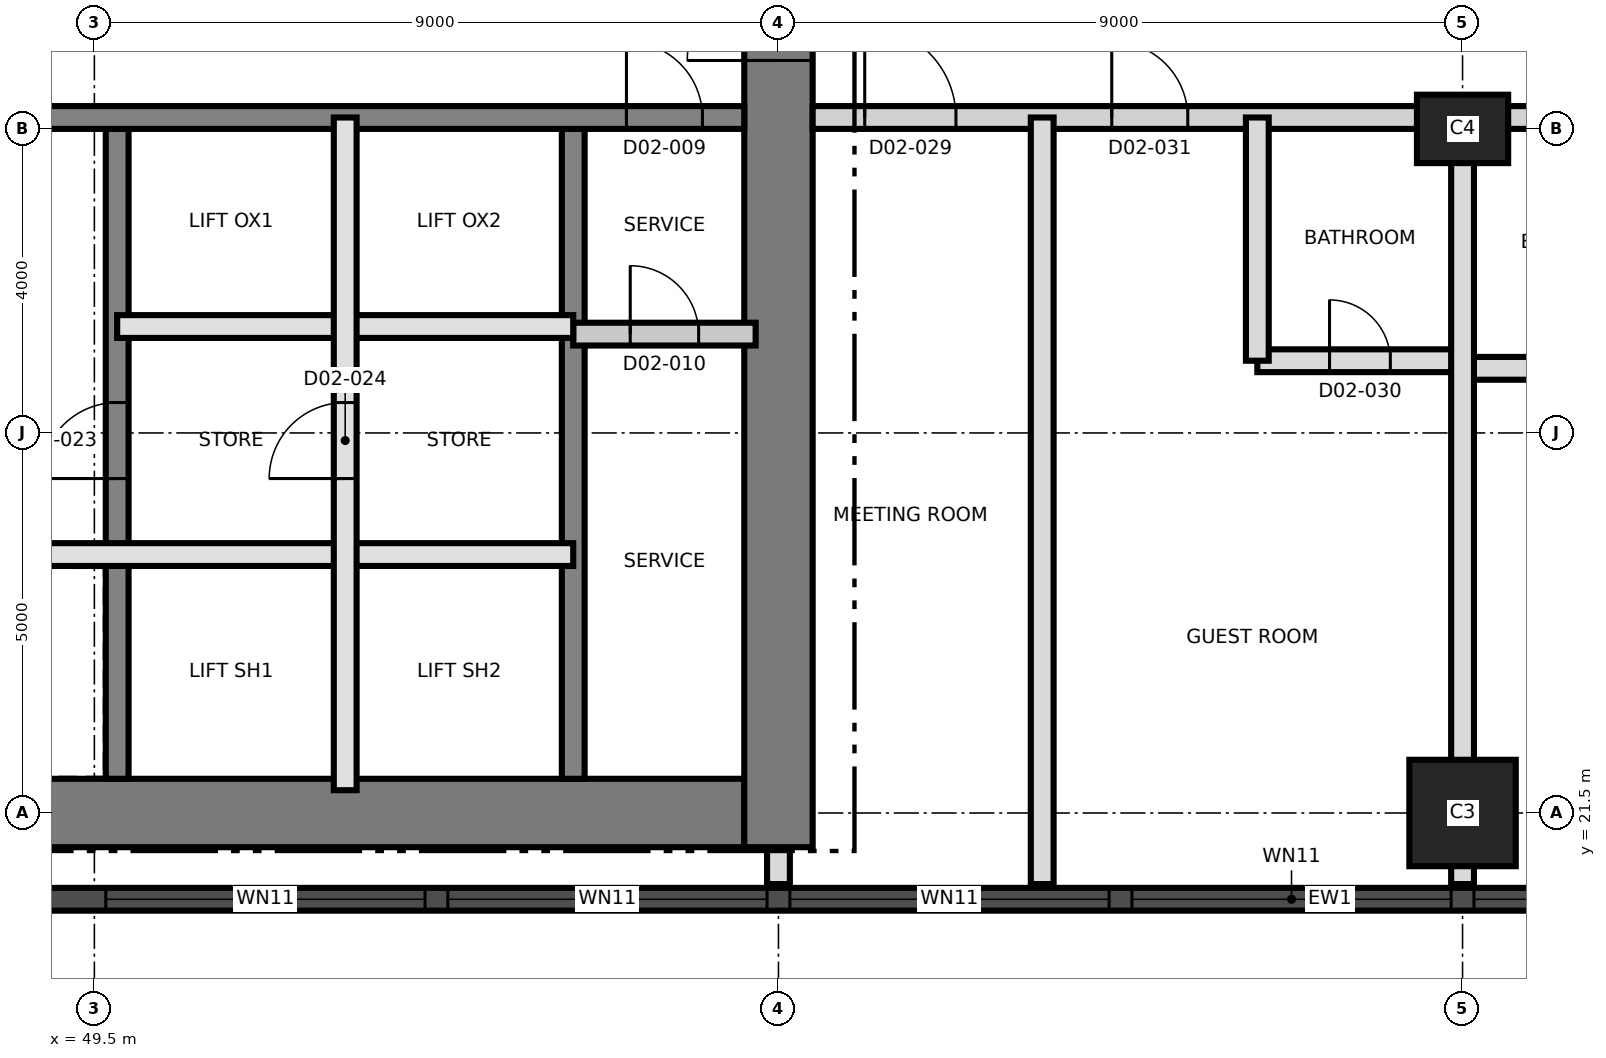
"""IFC4 building model, lengths in metres.
Left out: names, types, materials, properties, quantities, classifications, styles, units other than length and angle.
Written with IfcOpenShell. Run it as: python <this file> out.ifc"""

import sys

from ifc_helpers import new_model, si_unit, direction, frame, frame_2d, origin, origin_2d, place, context, subcontext, project, spatial, rectangle, extrude, element, fill, save


model = new_model("IFC4")
c1 = context("Model", 3, precision=1e-05, world=origin(), true_north=direction((0.0, 1.0)))
c2 = subcontext(c1, "Body", "Model", "MODEL_VIEW")
j1 = project(units=[si_unit("LENGTHUNIT", "METRE"), si_unit("PLANEANGLEUNIT", "RADIAN")], contexts=[c1])
p1 = place(None, origin())
s1 = spatial("IfcSite", under=j1, at=p1, CompositionType="ELEMENT")
p2 = place(p1, origin())
s2 = spatial("IfcBuilding", under=s1, at=p2, CompositionType="ELEMENT")
p3 = place(p2, frame((0.0, 0.0, 44.6)))
s3 = spatial("IfcBuildingStorey", under=s2, at=p3, CompositionType="ELEMENT", Elevation=44.6)
p4 = place(p3, frame((31.05, 21.5, 0.0), z_axis=(0.0, 0.0, 1.0), x_axis=(1.0, 0.0, 0.0)))
e1 = element("IfcWall", 1, at=p4, inside=s3, PredefinedType="SHEAR", context=c2, shape_type="SweptSolid", body=[
    extrude(rectangle(XDim=27.0, YDim=0.9, at=frame_2d((13.5, 0.0))), origin(), (0.0, 0.0, 1.0), 3.7),
])
p5 = place(p3, frame((58.5, 21.05, 0.0), z_axis=(0.0, 0.0, 1.0), x_axis=(0.0, 1.0, 0.0)))
e2 = element("IfcWall", 2, at=p5, inside=s3, PredefinedType="SHEAR", context=c2, shape_type="SweptSolid", body=[
    extrude(rectangle(XDim=18.9, YDim=0.9, at=frame_2d((9.45, 0.0))), origin(), (0.0, 0.0, 1.0), 3.7),
])
p6 = place(p5, frame((10.35, 0.0, 0.0)))
e3 = element("IfcOpeningElement", 3, at=p6, cuts=e2, PredefinedType="OPENING", context=c2, shape_type="SweptSolid", body=[
    extrude(rectangle(XDim=1.2, YDim=2.1, at=frame_2d((0.6, 1.05))), frame((0.0, 0.46, 0.0), z_axis=(0.0, -1.0, 0.0), x_axis=(1.0, 0.0, 0.0)), (0.0, 0.0, 1.0), 0.92),
])
p7 = place(p3, frame((49.8, 21.95, 0.0), z_axis=(0.0, 0.0, 1.0), x_axis=(0.0, 1.0, 0.0)))
e4 = element("IfcWall", 4, at=p7, inside=s3, PredefinedType="SHEAR", context=c2, shape_type="SweptSolid", body=[
    extrude(rectangle(XDim=8.55, YDim=0.3, at=frame_2d((4.275, 0.0))), origin(), (0.0, 0.0, 1.0), 3.7),
])
p8 = place(p7, frame((3.95, 0.0, 0.0)))
e5 = element("IfcOpeningElement", 5, at=p8, cuts=e4, PredefinedType="OPENING", context=c2, shape_type="SweptSolid", body=[
    extrude(rectangle(XDim=1.0, YDim=2.1, at=frame_2d((0.5, 1.05))), frame((0.0, 0.16, 0.0), z_axis=(0.0, -1.0, 0.0), x_axis=(1.0, 0.0, 0.0)), (0.0, 0.0, 1.0), 0.32),
])
p9 = place(p3, frame((55.8, 21.95, 0.0), z_axis=(0.0, 0.0, 1.0), x_axis=(0.0, 1.0, 0.0)))
e6 = element("IfcWall", 6, at=p9, inside=s3, PredefinedType="SHEAR", context=c2, shape_type="SweptSolid", body=[
    extrude(rectangle(XDim=8.55, YDim=0.3, at=frame_2d((4.275, 0.0))), origin(), (0.0, 0.0, 1.0), 3.7),
])
p10 = place(p3, frame((31.95, 30.65, 0.0), z_axis=(0.0, 0.0, 1.0), x_axis=(1.0, 0.0, 0.0)))
e7 = element("IfcWall", 7, at=p10, inside=s3, PredefinedType="SHEAR", context=c2, shape_type="SweptSolid", body=[
    extrude(rectangle(XDim=26.1, YDim=0.3, at=frame_2d((13.05, 0.0))), origin(), (0.0, 0.0, 1.0), 3.7),
])
p11 = place(p10, frame((24.55, 0.0, 0.0)))
e8 = element("IfcOpeningElement", 8, at=p11, cuts=e7, PredefinedType="OPENING", context=c2, shape_type="SweptSolid", body=[
    extrude(rectangle(XDim=1.0, YDim=2.1, at=frame_2d((0.5, 1.05))), frame((0.0, 0.16, 0.0), z_axis=(0.0, -1.0, 0.0), x_axis=(1.0, 0.0, 0.0)), (0.0, 0.0, 1.0), 0.32),
])
p12 = place(p10, frame((11.35, 0.0, 0.0)))
e9 = element("IfcOpeningElement", 9, at=p12, cuts=e7, PredefinedType="OPENING", context=c2, shape_type="SweptSolid", body=[
    extrude(rectangle(XDim=1.0, YDim=2.1, at=frame_2d((0.5, 1.05))), frame((0.0, 0.16, 0.0), z_axis=(0.0, -1.0, 0.0), x_axis=(1.0, 0.0, 0.0)), (0.0, 0.0, 1.0), 0.32),
])
p13 = place(p3, frame((67.5, 21.5, 0.0), z_axis=(0.0, 0.0, 1.0), x_axis=(1.0, 0.0, 0.0)))
e10 = element("IfcColumn", 10, at=p13, inside=s3, PredefinedType="COLUMN", context=c2, shape_type="SweptSolid", body=[
    extrude(rectangle(XDim=1.4, YDim=1.4, at=origin_2d()), origin(), (0.0, 0.0, 1.0), 3.7),
])
p14 = place(p3, frame((67.5, 30.5, 0.0), z_axis=(0.0, 0.0, 1.0), x_axis=(1.0, 0.0, 0.0)))
e11 = element("IfcColumn", 11, at=p14, inside=s3, PredefinedType="COLUMN", context=c2, shape_type="SweptSolid", body=[
    extrude(rectangle(XDim=1.2, YDim=0.9, at=origin_2d()), origin(), (0.0, 0.0, 1.0), 3.7),
])
p15 = place(p3, frame((44.021, 20.365, 0.0), z_axis=(0.0, 0.0, 1.0), x_axis=(1.0, 0.0, 0.0)))
e12 = element("IfcWall", 12, at=p15, inside=s3, PredefinedType="SOLIDWALL", context=c2, shape_type="SweptSolid", body=[
    extrude(rectangle(XDim=43.466, YDim=0.3, at=frame_2d((21.733, 0.0))), origin(), (0.0, 0.0, 1.0), 3.4),
])
p16 = place(p15, frame((1.84, 0.0, 0.3)))
e13 = element("IfcOpeningElement", 13, at=p16, cuts=e12, PredefinedType="OPENING", context=c2, shape_type="SweptSolid", body=[
    extrude(rectangle(XDim=1.8, YDim=2.4, at=frame_2d((0.9, 1.2))), frame((0.0, 0.16, 0.0), z_axis=(0.0, -1.0, 0.0), x_axis=(1.0, 0.0, 0.0)), (0.0, 0.0, 1.0), 0.32),
])
p17 = place(p15, frame((5.63, 0.0, 0.9)))
e14 = element("IfcOpeningElement", 14, at=p17, cuts=e12, PredefinedType="OPENING", context=c2, shape_type="SweptSolid", body=[
    extrude(rectangle(XDim=4.2, YDim=1.5, at=frame_2d((2.1, 0.75))), frame((0.0, 0.16, 0.0), z_axis=(0.0, -1.0, 0.0), x_axis=(1.0, 0.0, 0.0)), (0.0, 0.0, 1.0), 0.32),
])
p18 = place(p15, frame((10.13, 0.0, 0.9)))
e15 = element("IfcOpeningElement", 15, at=p18, cuts=e12, PredefinedType="OPENING", context=c2, shape_type="SweptSolid", body=[
    extrude(rectangle(XDim=4.2, YDim=1.5, at=frame_2d((2.1, 0.75))), frame((0.0, 0.16, 0.0), z_axis=(0.0, -1.0, 0.0), x_axis=(1.0, 0.0, 0.0)), (0.0, 0.0, 1.0), 0.32),
])
p19 = place(p15, frame((14.63, 0.0, 0.9)))
e16 = element("IfcOpeningElement", 16, at=p19, cuts=e12, PredefinedType="OPENING", context=c2, shape_type="SweptSolid", body=[
    extrude(rectangle(XDim=4.2, YDim=1.5, at=frame_2d((2.1, 0.75))), frame((0.0, 0.16, 0.0), z_axis=(0.0, -1.0, 0.0), x_axis=(1.0, 0.0, 0.0)), (0.0, 0.0, 1.0), 0.32),
])
p20 = place(p15, frame((19.13, 0.0, 0.9)))
e17 = element("IfcOpeningElement", 17, at=p20, cuts=e12, PredefinedType="OPENING", context=c2, shape_type="SweptSolid", body=[
    extrude(rectangle(XDim=4.2, YDim=1.5, at=frame_2d((2.1, 0.75))), frame((0.0, 0.16, 0.0), z_axis=(0.0, -1.0, 0.0), x_axis=(1.0, 0.0, 0.0)), (0.0, 0.0, 1.0), 0.32),
])
p21 = place(p15, frame((23.63, 0.0, 0.9)))
e18 = element("IfcOpeningElement", 18, at=p21, cuts=e12, PredefinedType="OPENING", context=c2, shape_type="SweptSolid", body=[
    extrude(rectangle(XDim=4.2, YDim=1.5, at=frame_2d((2.1, 0.75))), frame((0.0, 0.16, 0.0), z_axis=(0.0, -1.0, 0.0), x_axis=(1.0, 0.0, 0.0)), (0.0, 0.0, 1.0), 0.32),
])
p22 = place(p15, frame((28.13, 0.0, 0.9)))
e19 = element("IfcOpeningElement", 19, at=p22, cuts=e12, PredefinedType="OPENING", context=c2, shape_type="SweptSolid", body=[
    extrude(rectangle(XDim=4.2, YDim=1.5, at=frame_2d((2.1, 0.75))), frame((0.0, 0.16, 0.0), z_axis=(0.0, -1.0, 0.0), x_axis=(1.0, 0.0, 0.0)), (0.0, 0.0, 1.0), 0.32),
])
p23 = place(p15, frame((32.63, 0.0, 0.9)))
e20 = element("IfcOpeningElement", 20, at=p23, cuts=e12, PredefinedType="OPENING", context=c2, shape_type="SweptSolid", body=[
    extrude(rectangle(XDim=4.2, YDim=1.5, at=frame_2d((2.1, 0.75))), frame((0.0, 0.16, 0.0), z_axis=(0.0, -1.0, 0.0), x_axis=(1.0, 0.0, 0.0)), (0.0, 0.0, 1.0), 0.32),
])
p24 = place(p15, frame((37.13, 0.0, 0.9)))
e21 = element("IfcOpeningElement", 21, at=p24, cuts=e12, PredefinedType="OPENING", context=c2, shape_type="SweptSolid", body=[
    extrude(rectangle(XDim=4.2, YDim=1.5, at=frame_2d((2.1, 0.75))), frame((0.0, 0.16, 0.0), z_axis=(0.0, -1.0, 0.0), x_axis=(1.0, 0.0, 0.0)), (0.0, 0.0, 1.0), 0.32),
])
p25 = place(p3, frame((46.8, 24.9, 0.0), z_axis=(0.0, 0.0, 1.0), x_axis=(1.0, 0.0, 0.0)))
e22 = element("IfcWall", 22, at=p25, inside=s3, PredefinedType="SOLIDWALL", context=c2, shape_type="SweptSolid", body=[
    extrude(rectangle(XDim=9.0, YDim=0.3, at=frame_2d((4.5, 0.0))), origin(), (0.0, 0.0, 1.0), 3.4),
])
p26 = place(p25, frame((1.05, 0.0, 0.0)))
e23 = element("IfcOpeningElement", 23, at=p26, cuts=e22, PredefinedType="OPENING", context=c2, shape_type="SweptSolid", body=[
    extrude(rectangle(XDim=0.9, YDim=2.1, at=frame_2d((0.45, 1.05))), frame((0.0, 0.16, 0.0), z_axis=(0.0, -1.0, 0.0), x_axis=(1.0, 0.0, 0.0)), (0.0, 0.0, 1.0), 0.32),
])
p27 = place(p3, frame((55.8, 27.8, 0.0), z_axis=(0.0, 0.0, 1.0), x_axis=(1.0, 0.0, 0.0)))
e24 = element("IfcWall", 24, at=p27, inside=s3, PredefinedType="PARTITIONING", context=c2, shape_type="SweptSolid", body=[
    extrude(rectangle(XDim=2.4, YDim=0.3, at=frame_2d((1.2, 0.0))), origin(), (0.0, 0.0, 1.0), 3.4),
])
p28 = place(p27, frame((0.75, 0.0, 0.0)))
e25 = element("IfcOpeningElement", 25, at=p28, cuts=e24, PredefinedType="OPENING", context=c2, shape_type="SweptSolid", body=[
    extrude(rectangle(XDim=0.9, YDim=2.1, at=frame_2d((0.45, 1.05))), frame((0.0, 0.16, 0.0), z_axis=(0.0, -1.0, 0.0), x_axis=(1.0, 0.0, 0.0)), (0.0, 0.0, 1.0), 0.32),
])
p29 = place(p3, frame((49.8, 27.9, 0.0), z_axis=(0.0, 0.0, 1.0), x_axis=(1.0, 0.0, 0.0)))
e26 = element("IfcWall", 26, at=p29, inside=s3, PredefinedType="SOLIDWALL", context=c2, shape_type="SweptSolid", body=[
    extrude(rectangle(XDim=6.0, YDim=0.3, at=frame_2d((3.0, 0.0))), origin(), (0.0, 0.0, 1.0), 3.4),
])
p30 = place(p3, frame((52.8, 21.8, 0.0), z_axis=(0.0, 0.0, 1.0), x_axis=(0.0, 1.0, 0.0)))
e27 = element("IfcWall", 27, at=p30, inside=s3, PredefinedType="SOLIDWALL", context=c2, shape_type="SweptSolid", body=[
    extrude(rectangle(XDim=8.85, YDim=0.3, at=frame_2d((4.425, 0.0))), origin(), (0.0, 0.0, 1.0), 3.4),
])
p31 = place(p30, frame((4.1, 0.0, 0.0)))
e28 = element("IfcOpeningElement", 28, at=p31, cuts=e27, PredefinedType="OPENING", context=c2, shape_type="SweptSolid", body=[
    extrude(rectangle(XDim=1.0, YDim=2.1, at=frame_2d((0.5, 1.05))), frame((0.0, 0.16, 0.0), z_axis=(0.0, -1.0, 0.0), x_axis=(1.0, 0.0, 0.0)), (0.0, 0.0, 1.0), 0.32),
])
p32 = place(p3, frame((67.5, 27.35, 0.0), z_axis=(0.0, 0.0, 1.0), x_axis=(1.0, 0.0, 0.0)))
e29 = element("IfcWall", 29, at=p32, inside=s3, PredefinedType="PARTITIONING", context=c2, shape_type="SweptSolid", body=[
    extrude(rectangle(XDim=3.0, YDim=0.3, at=frame_2d((1.5, 0.0))), origin(), (0.0, 0.0, 1.0), 3.4),
])
p33 = place(p32, frame((1.1, 0.0, 0.0)))
e30 = element("IfcOpeningElement", 30, at=p33, cuts=e29, PredefinedType="OPENING", context=c2, shape_type="SweptSolid", body=[
    extrude(rectangle(XDim=0.8, YDim=2.1, at=frame_2d((0.4, 1.05))), frame((0.0, 0.16, 0.0), z_axis=(0.0, -1.0, 0.0), x_axis=(1.0, 0.0, 0.0)), (0.0, 0.0, 1.0), 0.32),
])
p34 = place(p3, frame((64.8, 27.45, 0.0), z_axis=(0.0, 0.0, 1.0), x_axis=(1.0, 0.0, 0.0)))
e31 = element("IfcWall", 31, at=p34, inside=s3, PredefinedType="PARTITIONING", context=c2, shape_type="SweptSolid", body=[
    extrude(rectangle(XDim=2.7, YDim=0.3, at=frame_2d((1.35, 0.0))), origin(), (0.0, 0.0, 1.0), 3.4),
])
p35 = place(p34, frame((0.95, 0.0, 0.0)))
e32 = element("IfcOpeningElement", 32, at=p35, cuts=e31, PredefinedType="OPENING", context=c2, shape_type="SweptSolid", body=[
    extrude(rectangle(XDim=0.8, YDim=2.1, at=frame_2d((0.4, 1.05))), frame((0.0, 0.16, 0.0), z_axis=(0.0, -1.0, 0.0), x_axis=(1.0, 0.0, 0.0)), (0.0, 0.0, 1.0), 0.32),
])
p36 = place(p3, frame((58.95, 30.65, 0.0), z_axis=(0.0, 0.0, 1.0), x_axis=(1.0, 0.0, 0.0)))
e33 = element("IfcWall", 33, at=p36, inside=s3, PredefinedType="PARTITIONING", context=c2, shape_type="SweptSolid", body=[
    extrude(rectangle(XDim=26.38, YDim=0.3, at=frame_2d((13.19, 0.0))), origin(), (0.0, 0.0, 1.0), 3.4),
])
p37 = place(p36, frame((0.685, 0.0, 0.0)))
e34 = element("IfcOpeningElement", 34, at=p37, cuts=e33, PredefinedType="OPENING", context=c2, shape_type="SweptSolid", body=[
    extrude(rectangle(XDim=1.2, YDim=2.1, at=frame_2d((0.6, 1.05))), frame((0.0, 0.16, 0.0), z_axis=(0.0, -1.0, 0.0), x_axis=(1.0, 0.0, 0.0)), (0.0, 0.0, 1.0), 0.32),
])
p38 = place(p36, frame((3.935, 0.0, 0.0)))
e35 = element("IfcOpeningElement", 35, at=p38, cuts=e33, PredefinedType="OPENING", context=c2, shape_type="SweptSolid", body=[
    extrude(rectangle(XDim=1.0, YDim=2.1, at=frame_2d((0.5, 1.05))), frame((0.0, 0.16, 0.0), z_axis=(0.0, -1.0, 0.0), x_axis=(1.0, 0.0, 0.0)), (0.0, 0.0, 1.0), 0.32),
])
p39 = place(p36, frame((12.55, 0.0, 0.0)))
e36 = element("IfcOpeningElement", 36, at=p39, cuts=e33, PredefinedType="OPENING", context=c2, shape_type="SweptSolid", body=[
    extrude(rectangle(XDim=1.0, YDim=2.4, at=frame_2d((0.5, 1.2))), frame((0.0, 0.16, 0.0), z_axis=(0.0, -1.0, 0.0), x_axis=(1.0, 0.0, 0.0)), (0.0, 0.0, 1.0), 0.32),
])
p40 = place(p36, frame((20.98, 0.0, 0.0)))
e37 = element("IfcOpeningElement", 37, at=p40, cuts=e33, PredefinedType="OPENING", context=c2, shape_type="SweptSolid", body=[
    extrude(rectangle(XDim=1.0, YDim=2.4, at=frame_2d((0.5, 1.2))), frame((0.0, 0.16, 0.0), z_axis=(0.0, -1.0, 0.0), x_axis=(1.0, 0.0, 0.0)), (0.0, 0.0, 1.0), 0.32),
])
p41 = place(p36, frame((22.63, 0.0, 0.0)))
e38 = element("IfcOpeningElement", 38, at=p41, cuts=e33, PredefinedType="OPENING", context=c2, shape_type="SweptSolid", body=[
    extrude(rectangle(XDim=1.0, YDim=2.4, at=frame_2d((0.5, 1.2))), frame((0.0, 0.16, 0.0), z_axis=(0.0, -1.0, 0.0), x_axis=(1.0, 0.0, 0.0)), (0.0, 0.0, 1.0), 0.32),
])
p42 = place(p3, frame((58.5, 20.565, 0.0), z_axis=(0.0, 0.0, 1.0), x_axis=(0.0, 1.0, 0.0)))
e39 = element("IfcWall", 39, at=p42, inside=s3, PredefinedType="PARTITIONING", context=c2, shape_type="SweptSolid", body=[
    extrude(rectangle(XDim=0.465, YDim=0.3, at=frame_2d((0.232, 0.0))), origin(), (0.0, 0.0, 1.0), 3.4),
])
p43 = place(p3, frame((61.97, 20.565, 0.0), z_axis=(0.0, 0.0, 1.0), x_axis=(0.0, 1.0, 0.0)))
e40 = element("IfcWall", 40, at=p43, inside=s3, PredefinedType="PARTITIONING", context=c2, shape_type="SweptSolid", body=[
    extrude(rectangle(XDim=10.085, YDim=0.3, at=frame_2d((5.042, 0.0))), origin(), (0.0, 0.0, 1.0), 3.4),
])
p44 = place(p3, frame((64.8, 27.45, 0.0), z_axis=(0.0, 0.0, 1.0), x_axis=(0.0, 1.0, 0.0)))
e41 = element("IfcWall", 41, at=p44, inside=s3, PredefinedType="PARTITIONING", context=c2, shape_type="SweptSolid", body=[
    extrude(rectangle(XDim=3.2, YDim=0.3, at=frame_2d((1.6, 0.0))), origin(), (0.0, 0.0, 1.0), 3.4),
])
p45 = place(p3, frame((67.5, 20.565, 0.0), z_axis=(0.0, 0.0, 1.0), x_axis=(0.0, 1.0, 0.0)))
e42 = element("IfcWall", 42, at=p45, inside=s3, PredefinedType="PARTITIONING", context=c2, shape_type="SweptSolid", body=[
    extrude(rectangle(XDim=10.085, YDim=0.3, at=frame_2d((5.042, 0.0))), origin(), (0.0, 0.0, 1.0), 3.4),
])
p46 = place(p17, origin())
e43 = element("IfcWindow", 43, at=p46, inside=s3, PartitioningType="SINGLE_PANEL", PredefinedType="WINDOW", context=c2, shape_type="SweptSolid", body=[
    extrude(rectangle(XDim=4.2, YDim=1.5, at=frame_2d((2.1, 0.75))), frame((0.0, 0.03, 0.0), z_axis=(0.0, -1.0, 0.0), x_axis=(1.0, 0.0, 0.0)), (0.0, 0.0, 1.0), 0.06),
])
fill(e14, e43)
p47 = place(p18, origin())
e44 = element("IfcWindow", 44, at=p47, inside=s3, PartitioningType="SINGLE_PANEL", PredefinedType="WINDOW", context=c2, shape_type="SweptSolid", body=[
    extrude(rectangle(XDim=4.2, YDim=1.5, at=frame_2d((2.1, 0.75))), frame((0.0, 0.03, 0.0), z_axis=(0.0, -1.0, 0.0), x_axis=(1.0, 0.0, 0.0)), (0.0, 0.0, 1.0), 0.06),
])
fill(e15, e44)
p48 = place(p19, origin())
e45 = element("IfcWindow", 45, at=p48, inside=s3, PartitioningType="SINGLE_PANEL", PredefinedType="WINDOW", context=c2, shape_type="SweptSolid", body=[
    extrude(rectangle(XDim=4.2, YDim=1.5, at=frame_2d((2.1, 0.75))), frame((0.0, 0.03, 0.0), z_axis=(0.0, -1.0, 0.0), x_axis=(1.0, 0.0, 0.0)), (0.0, 0.0, 1.0), 0.06),
])
fill(e16, e45)
p49 = place(p20, origin())
e46 = element("IfcWindow", 46, at=p49, inside=s3, PartitioningType="SINGLE_PANEL", PredefinedType="WINDOW", context=c2, shape_type="SweptSolid", body=[
    extrude(rectangle(XDim=4.2, YDim=1.5, at=frame_2d((2.1, 0.75))), frame((0.0, 0.03, 0.0), z_axis=(0.0, -1.0, 0.0), x_axis=(1.0, 0.0, 0.0)), (0.0, 0.0, 1.0), 0.06),
])
fill(e17, e46)
p50 = place(p21, origin())
e47 = element("IfcWindow", 47, at=p50, inside=s3, PartitioningType="SINGLE_PANEL", PredefinedType="WINDOW", context=c2, shape_type="SweptSolid", body=[
    extrude(rectangle(XDim=4.2, YDim=1.5, at=frame_2d((2.1, 0.75))), frame((0.0, 0.03, 0.0), z_axis=(0.0, -1.0, 0.0), x_axis=(1.0, 0.0, 0.0)), (0.0, 0.0, 1.0), 0.06),
])
fill(e18, e47)
p51 = place(p11, origin())
e48 = element("IfcDoor", 48, at=p51, inside=s3, OperationType="SINGLE_SWING_LEFT", PredefinedType="DOOR", context=c2, shape_type="SweptSolid", body=[
    extrude(rectangle(XDim=1.0, YDim=2.1, at=frame_2d((0.5, 1.05))), frame((0.0, 0.025, 0.0), z_axis=(0.0, -1.0, 0.0), x_axis=(1.0, 0.0, 0.0)), (0.0, 0.0, 1.0), 0.05),
])
fill(e8, e48)
p52 = place(p28, origin())
e49 = element("IfcDoor", 49, at=p52, inside=s3, OperationType="SINGLE_SWING_RIGHT", PredefinedType="DOOR", context=c2, shape_type="SweptSolid", body=[
    extrude(rectangle(XDim=0.9, YDim=2.1, at=frame_2d((0.45, 1.05))), frame((0.0, 0.025, 0.0), z_axis=(0.0, -1.0, 0.0), x_axis=(1.0, 0.0, 0.0)), (0.0, 0.0, 1.0), 0.05),
])
fill(e25, e49)
p53 = place(p6, origin())
e50 = element("IfcDoor", 50, at=p53, inside=s3, OperationType="SINGLE_SWING_LEFT", PredefinedType="DOOR", context=c2, shape_type="SweptSolid", body=[
    extrude(rectangle(XDim=1.2, YDim=2.1, at=frame_2d((0.6, 1.05))), frame((0.0, 0.025, 0.0), z_axis=(0.0, -1.0, 0.0), x_axis=(1.0, 0.0, 0.0)), (0.0, 0.0, 1.0), 0.05),
])
fill(e3, e50)
p54 = place(p8, origin())
e51 = element("IfcDoor", 51, at=p54, inside=s3, OperationType="SINGLE_SWING_LEFT", PredefinedType="DOOR", context=c2, shape_type="SweptSolid", body=[
    extrude(rectangle(XDim=1.0, YDim=2.1, at=frame_2d((0.5, 1.05))), frame((0.0, 0.025, 0.0), z_axis=(0.0, -1.0, 0.0), x_axis=(1.0, 0.0, 0.0)), (0.0, 0.0, 1.0), 0.05),
])
fill(e5, e51)
p55 = place(p31, origin())
e52 = element("IfcDoor", 52, at=p55, inside=s3, OperationType="SINGLE_SWING_RIGHT", PredefinedType="DOOR", context=c2, shape_type="SweptSolid", body=[
    extrude(rectangle(XDim=1.0, YDim=2.1, at=frame_2d((0.5, 1.05))), frame((0.0, 0.025, 0.0), z_axis=(0.0, -1.0, 0.0), x_axis=(1.0, 0.0, 0.0)), (0.0, 0.0, 1.0), 0.05),
])
fill(e28, e52)
p56 = place(p37, origin())
e53 = element("IfcDoor", 53, at=p56, inside=s3, OperationType="SINGLE_SWING_LEFT", PredefinedType="DOOR", context=c2, shape_type="SweptSolid", body=[
    extrude(rectangle(XDim=1.2, YDim=2.1, at=frame_2d((0.6, 1.05))), frame((0.0, 0.025, 0.0), z_axis=(0.0, -1.0, 0.0), x_axis=(1.0, 0.0, 0.0)), (0.0, 0.0, 1.0), 0.05),
])
fill(e34, e53)
p57 = place(p35, origin())
e54 = element("IfcDoor", 54, at=p57, inside=s3, OperationType="SINGLE_SWING_RIGHT", PredefinedType="DOOR", context=c2, shape_type="SweptSolid", body=[
    extrude(rectangle(XDim=0.8, YDim=2.1, at=frame_2d((0.4, 1.05))), frame((0.0, 0.025, 0.0), z_axis=(0.0, -1.0, 0.0), x_axis=(1.0, 0.0, 0.0)), (0.0, 0.0, 1.0), 0.05),
])
fill(e32, e54)
p58 = place(p38, origin())
e55 = element("IfcDoor", 55, at=p58, inside=s3, OperationType="SINGLE_SWING_LEFT", PredefinedType="DOOR", context=c2, shape_type="SweptSolid", body=[
    extrude(rectangle(XDim=1.0, YDim=2.1, at=frame_2d((0.5, 1.05))), frame((0.0, 0.025, 0.0), z_axis=(0.0, -1.0, 0.0), x_axis=(1.0, 0.0, 0.0)), (0.0, 0.0, 1.0), 0.05),
])
fill(e35, e55)
save(model, sys.argv[1])
